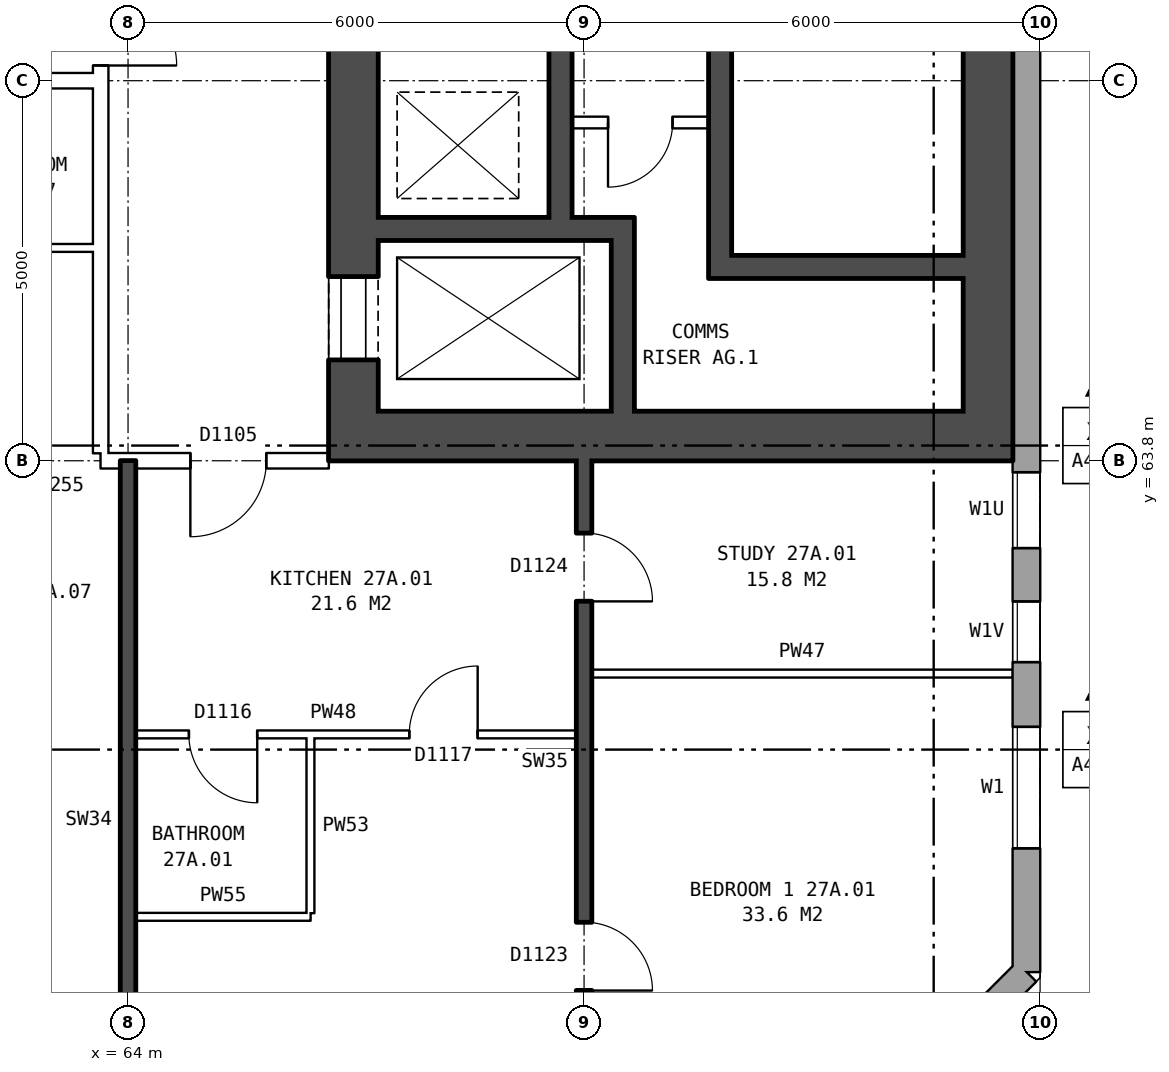
"""IFC4 building model, lengths in metres.
Left out: names, types, materials, properties, quantities, classifications, styles, units other than length and angle.
Written with IfcOpenShell. Run it as: python <this file> out.ifc"""

import sys

from ifc_helpers import new_model, si_unit, direction, frame, frame_2d, origin, place, context, subcontext, project, spatial, rectangle, extrude, element, fill, save


model = new_model("IFC4")
c1 = context("Model", 3, precision=1e-05, world=origin(), true_north=direction((0.0, 1.0)))
c2 = subcontext(c1, "Body", "Model", "MODEL_VIEW")
j1 = project(units=[si_unit("LENGTHUNIT", "METRE"), si_unit("PLANEANGLEUNIT", "RADIAN")], contexts=[c1])
p1 = place(None, origin())
s1 = spatial("IfcSite", under=j1, at=p1, CompositionType="ELEMENT")
p2 = place(p1, origin())
s2 = spatial("IfcBuilding", under=s1, at=p2, CompositionType="ELEMENT")
p3 = place(p2, frame((0.0, 0.0, 99.5)))
s3 = spatial("IfcBuildingStorey", under=s2, at=p3, CompositionType="ELEMENT", Elevation=99.5)
p4 = place(p3, frame((72.925, 54.18, 0.0), z_axis=(0.0, 0.0, 1.0), x_axis=(0.707106781187, 0.707106781187, 0.0)))
e1 = element("IfcWall", 1, at=p4, inside=s3, PredefinedType="STANDARD", context=c2, shape_type="SweptSolid", body=[
    extrude(rectangle(XDim=4.094, YDim=0.36, at=frame_2d((2.047, 0.0))), origin(), (0.0, 0.0, 1.0), 2.85),
])
p5 = place(p4, frame((1.247, 0.0, 0.8)))
e2 = element("IfcOpeningElement", 2, at=p5, cuts=e1, PredefinedType="OPENING", context=c2, shape_type="SweptSolid", body=[
    extrude(rectangle(XDim=1.6, YDim=1.8, at=frame_2d((0.8, 0.9))), frame((0.0, 0.19, 0.0), z_axis=(0.0, -1.0, 0.0), x_axis=(1.0, 0.0, 0.0)), (0.0, 0.0, 1.0), 0.38),
])
p6 = place(p3, frame((75.82, 57.075, 0.0), z_axis=(0.0, 0.0, 1.0), x_axis=(0.0, 1.0, 0.0)))
e3 = element("IfcWall", 3, at=p6, inside=s3, PredefinedType="STANDARD", context=c2, shape_type="SweptSolid", body=[
    extrude(rectangle(XDim=25.851, YDim=0.36, at=frame_2d((12.925, 0.0))), origin(), (0.0, 0.0, 1.0), 2.85),
])
p7 = place(p6, frame((1.625, 0.0, 0.8)))
e4 = element("IfcOpeningElement", 4, at=p7, cuts=e3, PredefinedType="OPENING", context=c2, shape_type="SweptSolid", body=[
    extrude(rectangle(XDim=1.6, YDim=1.8, at=frame_2d((0.8, 0.9))), frame((0.0, 0.19, 0.0), z_axis=(0.0, -1.0, 0.0), x_axis=(1.0, 0.0, 0.0)), (0.0, 0.0, 1.0), 0.38),
])
p8 = place(p6, frame((4.075, 0.0, 1.65)))
e5 = element("IfcOpeningElement", 5, at=p8, cuts=e3, PredefinedType="OPENING", context=c2, shape_type="SweptSolid", body=[
    extrude(rectangle(XDim=0.8, YDim=0.9, at=frame_2d((0.4, 0.45))), frame((0.0, 0.19, 0.0), z_axis=(0.0, -1.0, 0.0), x_axis=(1.0, 0.0, 0.0)), (0.0, 0.0, 1.0), 0.38),
])
p9 = place(p6, frame((20.775, 0.0, 1.7)))
e6 = element("IfcOpeningElement", 6, at=p9, cuts=e3, PredefinedType="OPENING", context=c2, shape_type="SweptSolid", body=[
    extrude(rectangle(XDim=1.4, YDim=0.9, at=frame_2d((0.7, 0.45))), frame((0.0, 0.19, 0.0), z_axis=(0.0, -1.0, 0.0), x_axis=(1.0, 0.0, 0.0)), (0.0, 0.0, 1.0), 0.38),
])
p10 = place(p6, frame((22.625, 0.0, 0.8)))
e7 = element("IfcOpeningElement", 7, at=p10, cuts=e3, PredefinedType="OPENING", context=c2, shape_type="SweptSolid", body=[
    extrude(rectangle(XDim=1.6, YDim=1.8, at=frame_2d((0.8, 0.9))), frame((0.0, 0.19, 0.0), z_axis=(0.0, -1.0, 0.0), x_axis=(1.0, 0.0, 0.0)), (0.0, 0.0, 1.0), 0.38),
])
p11 = place(p6, frame((5.575, 0.0, 0.45)))
e8 = element("IfcOpeningElement", 8, at=p11, cuts=e3, PredefinedType="OPENING", context=c2, shape_type="SweptSolid", body=[
    extrude(rectangle(XDim=1.0, YDim=0.9, at=frame_2d((0.5, 0.45))), frame((0.0, 0.19, 0.0), z_axis=(0.0, -1.0, 0.0), x_axis=(1.0, 0.0, 0.0)), (0.0, 0.0, 1.0), 0.38),
])
p12 = place(p3, frame((66.965, 64.45, 0.0), z_axis=(0.0, 0.0, 1.0), x_axis=(0.0, 1.0, 0.0)))
e9 = element("IfcWall", 9, at=p12, inside=s3, PredefinedType="SHEAR", context=c2, shape_type="SweptSolid", body=[
    extrude(rectangle(XDim=11.1, YDim=0.65, at=frame_2d((5.55, 0.0))), origin(), (0.0, 0.0, 1.0), 2.85),
])
p13 = place(p12, frame((0.675, 0.0, 0.0)))
e10 = element("IfcOpeningElement", 10, at=p13, cuts=e9, PredefinedType="OPENING", context=c2, shape_type="SweptSolid", body=[
    extrude(rectangle(XDim=1.1, YDim=2.1, at=frame_2d((0.55, 1.05))), frame((0.0, 0.335, 0.0), z_axis=(0.0, -1.0, 0.0), x_axis=(1.0, 0.0, 0.0)), (0.0, 0.0, 1.0), 0.67),
])
p14 = place(p12, frame((9.25, 0.0, 0.0)))
e11 = element("IfcOpeningElement", 11, at=p14, cuts=e9, PredefinedType="OPENING", context=c2, shape_type="SweptSolid", body=[
    extrude(rectangle(XDim=1.1, YDim=2.1, at=frame_2d((0.55, 1.05))), frame((0.0, 0.335, 0.0), z_axis=(0.0, -1.0, 0.0), x_axis=(1.0, 0.0, 0.0)), (0.0, 0.0, 1.0), 0.67),
])
p15 = place(p3, frame((75.315, 64.45, 0.0), z_axis=(0.0, 0.0, 1.0), x_axis=(0.0, 1.0, 0.0)))
e12 = element("IfcWall", 12, at=p15, inside=s3, PredefinedType="SHEAR", context=c2, shape_type="SweptSolid", body=[
    extrude(rectangle(XDim=11.1, YDim=0.65, at=frame_2d((5.55, 0.0))), origin(), (0.0, 0.0, 1.0), 2.85),
])
p16 = place(p3, frame((66.64, 64.125, 0.0), z_axis=(0.0, 0.0, 1.0), x_axis=(1.0, 0.0, 0.0)))
e13 = element("IfcWall", 13, at=p16, inside=s3, PredefinedType="SHEAR", context=c2, shape_type="SweptSolid", body=[
    extrude(rectangle(XDim=9.0, YDim=0.65, at=frame_2d((4.5, 0.0))), origin(), (0.0, 0.0, 1.0), 2.85),
])
p17 = place(p3, frame((71.94, 66.35, 0.0), z_axis=(0.0, 0.0, 1.0), x_axis=(1.0, 0.0, 0.0)))
e14 = element("IfcWall", 14, at=p17, inside=s3, PredefinedType="SHEAR", context=c2, shape_type="SweptSolid", body=[
    extrude(rectangle(XDim=3.05, YDim=0.3, at=frame_2d((1.525, 0.0))), origin(), (0.0, 0.0, 1.0), 2.85),
])
p18 = place(p3, frame((67.29, 66.85, 0.0), z_axis=(0.0, 0.0, 1.0), x_axis=(1.0, 0.0, 0.0)))
e15 = element("IfcWall", 15, at=p18, inside=s3, PredefinedType="SHEAR", context=c2, shape_type="SweptSolid", body=[
    extrude(rectangle(XDim=3.37, YDim=0.3, at=frame_2d((1.685, 0.0))), origin(), (0.0, 0.0, 1.0), 2.85),
])
p19 = place(p3, frame((69.84, 68.25, 0.0), z_axis=(0.0, 0.0, 1.0), x_axis=(1.0, 0.0, 0.0)))
e16 = element("IfcWall", 16, at=p19, inside=s3, PredefinedType="PARTITIONING", context=c2, shape_type="SweptSolid", body=[
    extrude(rectangle(XDim=1.8, YDim=0.15, at=frame_2d((0.9, 0.0))), origin(), (0.0, 0.0, 1.0), 2.85),
])
p20 = place(p19, frame((0.475, 0.0, 0.0)))
e17 = element("IfcOpeningElement", 17, at=p20, cuts=e16, PredefinedType="OPENING", context=c2, shape_type="SweptSolid", body=[
    extrude(rectangle(XDim=0.85, YDim=2.1, at=frame_2d((0.425, 1.05))), frame((0.0, 0.085, 0.0), z_axis=(0.0, -1.0, 0.0), x_axis=(1.0, 0.0, 0.0)), (0.0, 0.0, 1.0), 0.17),
])
p21 = place(p3, frame((69.69, 67.0, 0.0), z_axis=(0.0, 0.0, 1.0), x_axis=(0.0, 1.0, 0.0)))
e18 = element("IfcWall", 18, at=p21, inside=s3, PredefinedType="SHEAR", context=c2, shape_type="SweptSolid", body=[
    extrude(rectangle(XDim=6.6, YDim=0.3, at=frame_2d((3.3, 0.0))), origin(), (0.0, 0.0, 1.0), 2.85),
])
p22 = place(p3, frame((70.51, 64.45, 0.0), z_axis=(0.0, 0.0, 1.0), x_axis=(0.0, 1.0, 0.0)))
e19 = element("IfcWall", 19, at=p22, inside=s3, PredefinedType="SHEAR", context=c2, shape_type="SweptSolid", body=[
    extrude(rectangle(XDim=2.25, YDim=0.3, at=frame_2d((1.125, 0.0))), origin(), (0.0, 0.0, 1.0), 2.85),
])
p23 = place(p3, frame((71.79, 66.2, 0.0), z_axis=(0.0, 0.0, 1.0), x_axis=(0.0, 1.0, 0.0)))
e20 = element("IfcWall", 20, at=p23, inside=s3, PredefinedType="SHEAR", context=c2, shape_type="SweptSolid", body=[
    extrude(rectangle(XDim=7.25, YDim=0.3, at=frame_2d((3.625, 0.0))), origin(), (0.0, 0.0, 1.0), 2.85),
])
p24 = place(p23, frame((5.8, 0.0, 0.0)))
e21 = element("IfcOpeningElement", 21, at=p24, cuts=e20, PredefinedType="OPENING", context=c2, shape_type="SweptSolid", body=[
    extrude(rectangle(XDim=1.1, YDim=2.1, at=frame_2d((0.55, 1.05))), frame((0.0, 0.16, 0.0), z_axis=(0.0, -1.0, 0.0), x_axis=(1.0, 0.0, 0.0)), (0.0, 0.0, 1.0), 0.32),
])
p25 = place(p3, frame((63.64, 63.9, 0.0), z_axis=(0.0, 0.0, 1.0), x_axis=(0.0, 1.0, 0.0)))
e22 = element("IfcWall", 22, at=p25, inside=s3, PredefinedType="PARTITIONING", context=c2, shape_type="SweptSolid", body=[
    extrude(rectangle(XDim=12.2, YDim=0.2, at=frame_2d((6.1, 0.0))), origin(), (0.0, 0.0, 1.0), 2.85),
])
p26 = place(p25, frame((5.1, 0.0, 0.0)))
e23 = element("IfcOpeningElement", 23, at=p26, cuts=e22, PredefinedType="OPENING", context=c2, shape_type="SweptSolid", body=[
    extrude(rectangle(XDim=2.0, YDim=2.1, at=frame_2d((1.0, 1.05))), frame((0.0, 0.11, 0.0), z_axis=(0.0, -1.0, 0.0), x_axis=(1.0, 0.0, 0.0)), (0.0, 0.0, 1.0), 0.22),
])
p27 = place(p3, frame((64.1, 57.8, 0.0), z_axis=(0.0, 0.0, 1.0), x_axis=(1.0, 0.0, 0.0)))
e24 = element("IfcWall", 24, at=p27, inside=s3, PredefinedType="PARTITIONING", context=c2, shape_type="SweptSolid", body=[
    extrude(rectangle(XDim=2.3, YDim=0.1, at=frame_2d((1.15, 0.0))), origin(), (0.0, 0.0, 1.0), 2.85),
])
p28 = place(p3, frame((64.1, 60.2, 0.0), z_axis=(0.0, 0.0, 1.0), x_axis=(1.0, 0.0, 0.0)))
e25 = element("IfcWall", 25, at=p28, inside=s3, PredefinedType="PARTITIONING", context=c2, shape_type="SweptSolid", body=[
    extrude(rectangle(XDim=5.8, YDim=0.1, at=frame_2d((2.9, 0.0))), origin(), (0.0, 0.0, 1.0), 2.85),
])
p29 = place(p28, frame((3.6, 0.0, 0.0)))
e26 = element("IfcOpeningElement", 26, at=p29, cuts=e25, PredefinedType="OPENING", context=c2, shape_type="SweptSolid", body=[
    extrude(rectangle(XDim=0.9, YDim=2.1, at=frame_2d((0.45, 1.05))), frame((0.0, 0.06, 0.0), z_axis=(0.0, -1.0, 0.0), x_axis=(1.0, 0.0, 0.0)), (0.0, 0.0, 1.0), 0.12),
])
p30 = place(p28, frame((0.7, 0.0, 0.0)))
e27 = element("IfcOpeningElement", 27, at=p30, cuts=e25, PredefinedType="OPENING", context=c2, shape_type="SweptSolid", body=[
    extrude(rectangle(XDim=0.9, YDim=2.1, at=frame_2d((0.45, 1.05))), frame((0.0, 0.06, 0.0), z_axis=(0.0, -1.0, 0.0), x_axis=(1.0, 0.0, 0.0)), (0.0, 0.0, 1.0), 0.12),
])
p31 = place(p3, frame((70.1, 61.0, 0.0), z_axis=(0.0, 0.0, 1.0), x_axis=(1.0, 0.0, 0.0)))
e28 = element("IfcWall", 28, at=p31, inside=s3, PredefinedType="PARTITIONING", context=c2, shape_type="SweptSolid", body=[
    extrude(rectangle(XDim=5.54, YDim=0.1, at=frame_2d((2.77, 0.0))), origin(), (0.0, 0.0, 1.0), 2.85),
])
p32 = place(p3, frame((63.64, 63.8, 0.0), z_axis=(0.0, 0.0, 1.0), x_axis=(1.0, 0.0, 0.0)))
e29 = element("IfcWall", 29, at=p32, inside=s3, PredefinedType="PARTITIONING", context=c2, shape_type="SweptSolid", body=[
    extrude(rectangle(XDim=3.0, YDim=0.2, at=frame_2d((1.5, 0.0))), origin(), (0.0, 0.0, 1.0), 2.85),
])
p33 = place(p32, frame((1.18, 0.0, 0.0)))
e30 = element("IfcOpeningElement", 30, at=p33, cuts=e29, PredefinedType="OPENING", context=c2, shape_type="SweptSolid", body=[
    extrude(rectangle(XDim=1.0, YDim=2.1, at=frame_2d((0.5, 1.05))), frame((0.0, 0.11, 0.0), z_axis=(0.0, -1.0, 0.0), x_axis=(1.0, 0.0, 0.0)), (0.0, 0.0, 1.0), 0.22),
])
p34 = place(p3, frame((61.0, 66.6, 0.0), z_axis=(0.0, 0.0, 1.0), x_axis=(1.0, 0.0, 0.0)))
e31 = element("IfcWall", 31, at=p34, inside=s3, PredefinedType="PARTITIONING", context=c2, shape_type="SweptSolid", body=[
    extrude(rectangle(XDim=2.64, YDim=0.1, at=frame_2d((1.32, 0.0))), origin(), (0.0, 0.0, 1.0), 2.85),
])
p35 = place(p3, frame((44.36, 68.8, 0.0), z_axis=(0.0, 0.0, 1.0), x_axis=(1.0, 0.0, 0.0)))
e32 = element("IfcWall", 32, at=p35, inside=s3, PredefinedType="PARTITIONING", context=c2, shape_type="SweptSolid", body=[
    extrude(rectangle(XDim=19.28, YDim=0.2, at=frame_2d((9.64, 0.0))), origin(), (0.0, 0.0, 1.0), 2.85),
])
p36 = place(p35, frame((14.64, 0.0, 0.0)))
e33 = element("IfcOpeningElement", 33, at=p36, cuts=e32, PredefinedType="OPENING", context=c2, shape_type="SweptSolid", body=[
    extrude(rectangle(XDim=1.0, YDim=2.1, at=frame_2d((0.5, 1.05))), frame((0.0, 0.11, 0.0), z_axis=(0.0, -1.0, 0.0), x_axis=(1.0, 0.0, 0.0)), (0.0, 0.0, 1.0), 0.22),
])
p37 = place(p35, frame((11.64, 0.0, 0.0)))
e34 = element("IfcOpeningElement", 34, at=p37, cuts=e32, PredefinedType="OPENING", context=c2, shape_type="SweptSolid", body=[
    extrude(rectangle(XDim=1.0, YDim=2.1, at=frame_2d((0.5, 1.05))), frame((0.0, 0.11, 0.0), z_axis=(0.0, -1.0, 0.0), x_axis=(1.0, 0.0, 0.0)), (0.0, 0.0, 1.0), 0.22),
])
p38 = place(p35, frame((5.64, 0.0, 0.0)))
e35 = element("IfcOpeningElement", 35, at=p38, cuts=e32, PredefinedType="OPENING", context=c2, shape_type="SweptSolid", body=[
    extrude(rectangle(XDim=1.0, YDim=2.1, at=frame_2d((0.5, 1.05))), frame((0.0, 0.11, 0.0), z_axis=(0.0, -1.0, 0.0), x_axis=(1.0, 0.0, 0.0)), (0.0, 0.0, 1.0), 0.22),
])
p39 = place(p3, frame((64.0, 54.36, 0.0), z_axis=(0.0, 0.0, 1.0), x_axis=(0.0, 1.0, 0.0)))
e36 = element("IfcWall", 36, at=p39, inside=s3, PredefinedType="SOLIDWALL", context=c2, shape_type="SweptSolid", body=[
    extrude(rectangle(XDim=9.44, YDim=0.2, at=frame_2d((4.72, 0.0))), origin(), (0.0, 0.0, 1.0), 2.85),
])
p40 = place(p3, frame((66.4, 57.85, 0.0), z_axis=(0.0, 0.0, 1.0), x_axis=(0.0, 1.0, 0.0)))
e37 = element("IfcWall", 37, at=p40, inside=s3, PredefinedType="PARTITIONING", context=c2, shape_type="SweptSolid", body=[
    extrude(rectangle(XDim=2.3, YDim=0.1, at=frame_2d((1.15, 0.0))), origin(), (0.0, 0.0, 1.0), 2.85),
])
p41 = place(p3, frame((70.0, 54.36, 0.0), z_axis=(0.0, 0.0, 1.0), x_axis=(0.0, 1.0, 0.0)))
e38 = element("IfcWall", 38, at=p41, inside=s3, PredefinedType="SOLIDWALL", context=c2, shape_type="SweptSolid", body=[
    extrude(rectangle(XDim=9.44, YDim=0.2, at=frame_2d((4.72, 0.0))), origin(), (0.0, 0.0, 1.0), 2.85),
])
p42 = place(p41, frame((2.47, 0.0, 0.0)))
e39 = element("IfcOpeningElement", 39, at=p42, cuts=e38, PredefinedType="OPENING", context=c2, shape_type="SweptSolid", body=[
    extrude(rectangle(XDim=0.9, YDim=2.1, at=frame_2d((0.45, 1.05))), frame((0.0, 0.11, 0.0), z_axis=(0.0, -1.0, 0.0), x_axis=(1.0, 0.0, 0.0)), (0.0, 0.0, 1.0), 0.22),
])
p43 = place(p41, frame((7.59, 0.0, 0.0)))
e40 = element("IfcOpeningElement", 40, at=p43, cuts=e38, PredefinedType="OPENING", context=c2, shape_type="SweptSolid", body=[
    extrude(rectangle(XDim=0.9, YDim=2.1, at=frame_2d((0.45, 1.05))), frame((0.0, 0.11, 0.0), z_axis=(0.0, -1.0, 0.0), x_axis=(1.0, 0.0, 0.0)), (0.0, 0.0, 1.0), 0.22),
])
p44 = place(p7, origin())
e41 = element("IfcWindow", 41, at=p44, inside=s3, PartitioningType="SINGLE_PANEL", PredefinedType="WINDOW", context=c2, shape_type="SweptSolid", body=[
    extrude(rectangle(XDim=1.6, YDim=1.8, at=frame_2d((0.8, 0.9))), frame((0.0, 0.15, 0.0), z_axis=(0.0, -1.0, 0.0), x_axis=(1.0, 0.0, 0.0)), (0.0, 0.0, 1.0), 0.06),
])
fill(e4, e41)
p45 = place(p8, origin())
e42 = element("IfcWindow", 42, at=p45, inside=s3, PartitioningType="SINGLE_PANEL", PredefinedType="WINDOW", context=c2, shape_type="SweptSolid", body=[
    extrude(rectangle(XDim=0.8, YDim=0.9, at=frame_2d((0.4, 0.45))), frame((0.0, 0.15, 0.0), z_axis=(0.0, -1.0, 0.0), x_axis=(1.0, 0.0, 0.0)), (0.0, 0.0, 1.0), 0.06),
])
fill(e5, e42)
p46 = place(p13, origin())
e43 = element("IfcDoor", 43, at=p46, inside=s3, OperationType="DOUBLE_DOOR_SLIDING", PredefinedType="DOOR", context=c2, shape_type="SweptSolid", body=[
    extrude(rectangle(XDim=1.1, YDim=2.1, at=frame_2d((0.55, 1.05))), frame((0.0, -0.26, 0.0), z_axis=(0.0, -1.0, 0.0), x_axis=(1.0, 0.0, 0.0)), (0.0, 0.0, 1.0), 0.05),
])
fill(e10, e43)
p47 = place(p20, frame((0.85, 0.0, 0.0), z_axis=(0.0, 0.0, 1.0), x_axis=(-1.0, 0.0, 0.0)))
e44 = element("IfcDoor", 44, at=p47, inside=s3, OperationType="SINGLE_SWING_RIGHT", PredefinedType="DOOR", context=c2, shape_type="SweptSolid", body=[
    extrude(rectangle(XDim=0.85, YDim=2.1, at=frame_2d((0.425, 1.05))), frame((0.0, 0.025, 0.0), z_axis=(0.0, -1.0, 0.0), x_axis=(1.0, 0.0, 0.0)), (0.0, 0.0, 1.0), 0.05),
])
fill(e17, e44)
p48 = place(p26, frame((2.0, 0.0, 0.0), z_axis=(0.0, 0.0, 1.0), x_axis=(-1.0, 0.0, 0.0)))
e45 = element("IfcDoor", 45, at=p48, inside=s3, OperationType="DOUBLE_DOOR_SINGLE_SWING", PredefinedType="DOOR", context=c2, shape_type="SweptSolid", body=[
    extrude(rectangle(XDim=2.0, YDim=2.1, at=frame_2d((1.0, 1.05))), frame((0.0, 0.025, 0.0), z_axis=(0.0, -1.0, 0.0), x_axis=(1.0, 0.0, 0.0)), (0.0, 0.0, 1.0), 0.05),
])
fill(e23, e45)
p49 = place(p42, frame((0.9, 0.0, 0.0), z_axis=(0.0, 0.0, 1.0), x_axis=(-1.0, 0.0, 0.0)))
e46 = element("IfcDoor", 46, at=p49, inside=s3, OperationType="SINGLE_SWING_RIGHT", PredefinedType="DOOR", context=c2, shape_type="SweptSolid", body=[
    extrude(rectangle(XDim=0.9, YDim=2.1, at=frame_2d((0.45, 1.05))), frame((0.0, 0.025, 0.0), z_axis=(0.0, -1.0, 0.0), x_axis=(1.0, 0.0, 0.0)), (0.0, 0.0, 1.0), 0.05),
])
fill(e39, e46)
p50 = place(p43, frame((0.9, 0.0, 0.0), z_axis=(0.0, 0.0, 1.0), x_axis=(-1.0, 0.0, 0.0)))
e47 = element("IfcDoor", 47, at=p50, inside=s3, OperationType="SINGLE_SWING_RIGHT", PredefinedType="DOOR", context=c2, shape_type="SweptSolid", body=[
    extrude(rectangle(XDim=0.9, YDim=2.1, at=frame_2d((0.45, 1.05))), frame((0.0, 0.025, 0.0), z_axis=(0.0, -1.0, 0.0), x_axis=(1.0, 0.0, 0.0)), (0.0, 0.0, 1.0), 0.05),
])
fill(e40, e47)
p51 = place(p33, frame((1.0, 0.0, 0.0), z_axis=(0.0, 0.0, 1.0), x_axis=(-1.0, 0.0, 0.0)))
e48 = element("IfcDoor", 48, at=p51, inside=s3, OperationType="SINGLE_SWING_RIGHT", PredefinedType="DOOR", context=c2, shape_type="SweptSolid", body=[
    extrude(rectangle(XDim=1.0, YDim=2.1, at=frame_2d((0.5, 1.05))), frame((0.0, 0.025, 0.0), z_axis=(0.0, -1.0, 0.0), x_axis=(1.0, 0.0, 0.0)), (0.0, 0.0, 1.0), 0.05),
])
fill(e30, e48)
p52 = place(p29, origin())
e49 = element("IfcDoor", 49, at=p52, inside=s3, OperationType="SINGLE_SWING_RIGHT", PredefinedType="DOOR", context=c2, shape_type="SweptSolid", body=[
    extrude(rectangle(XDim=0.9, YDim=2.1, at=frame_2d((0.45, 1.05))), frame((0.0, 0.025, 0.0), z_axis=(0.0, -1.0, 0.0), x_axis=(1.0, 0.0, 0.0)), (0.0, 0.0, 1.0), 0.05),
])
fill(e26, e49)
p53 = place(p30, frame((0.9, 0.0, 0.0), z_axis=(0.0, 0.0, 1.0), x_axis=(-1.0, 0.0, 0.0)))
e50 = element("IfcDoor", 50, at=p53, inside=s3, OperationType="SINGLE_SWING_LEFT", PredefinedType="DOOR", context=c2, shape_type="SweptSolid", body=[
    extrude(rectangle(XDim=0.9, YDim=2.1, at=frame_2d((0.45, 1.05))), frame((0.0, 0.025, 0.0), z_axis=(0.0, -1.0, 0.0), x_axis=(1.0, 0.0, 0.0)), (0.0, 0.0, 1.0), 0.05),
])
fill(e27, e50)
p54 = place(p11, origin())
e51 = element("IfcWindow", 51, at=p54, inside=s3, PartitioningType="SINGLE_PANEL", PredefinedType="WINDOW", context=c2, shape_type="SweptSolid", body=[
    extrude(rectangle(XDim=1.0, YDim=0.9, at=frame_2d((0.5, 0.45))), frame((0.0, 0.15, 0.0), z_axis=(0.0, -1.0, 0.0), x_axis=(1.0, 0.0, 0.0)), (0.0, 0.0, 1.0), 0.06),
])
fill(e8, e51)
save(model, sys.argv[1])
